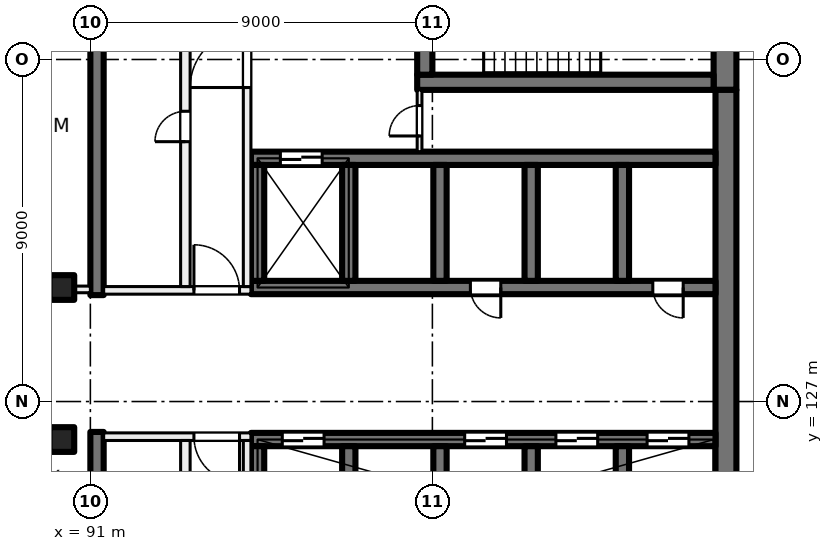
"""IFC4 building model, lengths in metres.
Left out: names, types, materials, properties, quantities, classifications, styles, units other than length and angle.
Written with IfcOpenShell. Run it as: python <this file> out.ifc"""

import sys

from ifc_helpers import new_model, si_unit, direction, frame, frame_2d, origin, origin_2d, place, context, subcontext, project, spatial, rectangle, extrude, element, fill, save


model = new_model("IFC4")
c1 = context("Model", 3, precision=1e-05, world=origin(), true_north=direction((0.0, 1.0)))
c2 = subcontext(c1, "Body", "Model", "MODEL_VIEW")
j1 = project(units=[si_unit("LENGTHUNIT", "METRE"), si_unit("PLANEANGLEUNIT", "RADIAN")], contexts=[c1])
p1 = place(None, origin())
s1 = spatial("IfcSite", under=j1, at=p1, CompositionType="ELEMENT")
p2 = place(p1, origin())
s2 = spatial("IfcBuilding", under=s1, at=p2, CompositionType="ELEMENT")
p3 = place(p2, frame((0.0, 0.0, 146.5)))
s3 = spatial("IfcBuildingStorey", under=s2, at=p3, CompositionType="ELEMENT", Elevation=146.5)
for number, where, z_axis, x_axis in (
    (1, (90.25, 130.0, 0.0), (0.0, 0.0, 1.0), (1.0, 0.0, 0.0)),
    (2, (90.25, 126.0, 0.0), (0.0, 0.0, 1.0), (1.0, 0.0, 0.0)),
):
    element("IfcColumn", number, at=place(p3, frame(where, z_axis=z_axis, x_axis=x_axis)), inside=s3, PredefinedType="COLUMN", context=c2, shape_type="SweptSolid", body=[
        extrude(rectangle(XDim=0.65, YDim=0.65, at=origin_2d()), origin(), (0.0, 0.0, 1.0), 4.0),
    ])
p4 = place(p3, frame((107.7, 139.0, 0.0), z_axis=(0.0, 0.0, 1.0), x_axis=(0.0, -1.0, 0.0)))
e3 = element("IfcWall", 3, at=p4, inside=s3, PredefinedType="SHEAR", context=c2, shape_type="SweptSolid", body=[
    extrude(rectangle(XDim=3.8, YDim=0.6, at=frame_2d((1.9, 0.0))), origin(), (0.0, 0.0, 1.0), 4.0),
])
p5 = place(p3, frame((107.725, 135.2, 0.0), z_axis=(0.0, 0.0, 1.0), x_axis=(0.0, -1.0, 0.0)))
e4 = element("IfcWall", 4, at=p5, inside=s3, PredefinedType="SHEAR", context=c2, shape_type="SweptSolid", body=[
    extrude(rectangle(XDim=14.4, YDim=0.55, at=frame_2d((7.2, 0.0))), origin(), (0.0, 0.0, 1.0), 4.0),
])
p6 = place(p3, frame((107.4, 135.4, 0.0), z_axis=(0.0, 0.0, 1.0), x_axis=(-1.0, 0.0, 0.0)))
e5 = element("IfcWall", 5, at=p6, inside=s3, PredefinedType="SHEAR", context=c2, shape_type="SweptSolid", body=[
    extrude(rectangle(XDim=7.8, YDim=0.4, at=frame_2d((3.9, 0.0))), origin(), (0.0, 0.0, 1.0), 4.0),
])
p7 = place(p3, frame((99.8, 138.4, 0.0), z_axis=(0.0, 0.0, 1.0), x_axis=(0.0, -1.0, 0.0)))
e6 = element("IfcWall", 6, at=p7, inside=s3, PredefinedType="SHEAR", context=c2, shape_type="SweptSolid", body=[
    extrude(rectangle(XDim=2.8, YDim=0.4, at=frame_2d((1.4, 0.0))), origin(), (0.0, 0.0, 1.0), 4.0),
])
p8 = place(p7, frame((0.875, 0.0, 0.0)))
e7 = element("IfcOpeningElement", 7, at=p8, cuts=e6, PredefinedType="OPENING", context=c2, shape_type="SweptSolid", body=[
    extrude(rectangle(XDim=1.0, YDim=2.1, at=frame_2d((0.5, 1.05))), frame((0.0, 0.21, 0.0), z_axis=(0.0, -1.0, 0.0), x_axis=(1.0, 0.0, 0.0)), (0.0, 0.0, 1.0), 0.42),
])
p9 = place(p3, frame((107.45, 130.0, 0.0), z_axis=(0.0, 0.0, 1.0), x_axis=(-1.0, 0.0, 0.0)))
e8 = element("IfcWall", 8, at=p9, inside=s3, PredefinedType="SHEAR", context=c2, shape_type="SweptSolid", body=[
    extrude(rectangle(XDim=12.225, YDim=0.35, at=frame_2d((6.112, 0.0))), origin(), (0.0, 0.0, 1.0), 4.0),
])
p10 = place(p9, frame((0.85, 0.0, 0.0)))
e9 = element("IfcOpeningElement", 9, at=p10, cuts=e8, PredefinedType="OPENING", context=c2, shape_type="SweptSolid", body=[
    extrude(rectangle(XDim=0.8, YDim=2.1, at=frame_2d((0.4, 1.05))), frame((0.0, 0.185, 0.0), z_axis=(0.0, -1.0, 0.0), x_axis=(1.0, 0.0, 0.0)), (0.0, 0.0, 1.0), 0.37),
])
p11 = place(p9, frame((5.65, 0.0, 0.0)))
e10 = element("IfcOpeningElement", 10, at=p11, cuts=e8, PredefinedType="OPENING", context=c2, shape_type="SweptSolid", body=[
    extrude(rectangle(XDim=0.8, YDim=2.1, at=frame_2d((0.4, 1.05))), frame((0.0, 0.185, 0.0), z_axis=(0.0, -1.0, 0.0), x_axis=(1.0, 0.0, 0.0)), (0.0, 0.0, 1.0), 0.37),
])
p12 = place(p3, frame((107.45, 133.4, 0.0), z_axis=(0.0, 0.0, 1.0), x_axis=(-1.0, 0.0, 0.0)))
e11 = element("IfcWall", 11, at=p12, inside=s3, PredefinedType="SHEAR", context=c2, shape_type="SweptSolid", body=[
    extrude(rectangle(XDim=12.225, YDim=0.35, at=frame_2d((6.112, 0.0))), origin(), (0.0, 0.0, 1.0), 4.0),
])
p13 = place(p12, frame((10.35, 0.0, 0.0)))
e12 = element("IfcOpeningElement", 12, at=p13, cuts=e11, PredefinedType="OPENING", context=c2, shape_type="SweptSolid", body=[
    extrude(rectangle(XDim=1.1, YDim=2.1, at=frame_2d((0.55, 1.05))), frame((0.0, 0.185, 0.0), z_axis=(0.0, -1.0, 0.0), x_axis=(1.0, 0.0, 0.0)), (0.0, 0.0, 1.0), 0.37),
])
for number, where, z_axis, x_axis in (
    (13, (105.0, 133.225, 0.0), (0.0, 0.0, 1.0), (0.0, -1.0, 0.0)),
    (14, (102.6, 133.225, 0.0), (0.0, 0.0, 1.0), (0.0, -1.0, 0.0)),
    (15, (100.2, 133.225, 0.0), (0.0, 0.0, 1.0), (0.0, -1.0, 0.0)),
    (16, (97.8, 133.225, 0.0), (0.0, 0.0, 1.0), (0.0, -1.0, 0.0)),
    (17, (95.4, 133.225, 0.0), (0.0, 0.0, 1.0), (0.0, -1.0, 0.0)),
):
    element("IfcWall", number, at=place(p3, frame(where, z_axis=z_axis, x_axis=x_axis)), inside=s3, PredefinedType="SHEAR", context=c2, shape_type="SweptSolid", body=[
        extrude(rectangle(XDim=3.05, YDim=0.35, at=frame_2d((1.525, 0.0))), origin(), (0.0, 0.0, 1.0), 4.0),
    ])
p14 = place(p3, frame((107.45, 126.0, 0.0), z_axis=(0.0, 0.0, 1.0), x_axis=(-1.0, 0.0, 0.0)))
e18 = element("IfcWall", 18, at=p14, inside=s3, PredefinedType="SHEAR", context=c2, shape_type="SweptSolid", body=[
    extrude(rectangle(XDim=12.225, YDim=0.35, at=frame_2d((6.112, 0.0))), origin(), (0.0, 0.0, 1.0), 4.0),
])
p15 = place(p14, frame((0.7, 0.0, 0.0)))
e19 = element("IfcOpeningElement", 19, at=p15, cuts=e18, PredefinedType="OPENING", context=c2, shape_type="SweptSolid", body=[
    extrude(rectangle(XDim=1.1, YDim=2.1, at=frame_2d((0.55, 1.05))), frame((0.0, 0.185, 0.0), z_axis=(0.0, -1.0, 0.0), x_axis=(1.0, 0.0, 0.0)), (0.0, 0.0, 1.0), 0.37),
])
p16 = place(p14, frame((3.1, 0.0, 0.0)))
e20 = element("IfcOpeningElement", 20, at=p16, cuts=e18, PredefinedType="OPENING", context=c2, shape_type="SweptSolid", body=[
    extrude(rectangle(XDim=1.1, YDim=2.1, at=frame_2d((0.55, 1.05))), frame((0.0, 0.185, 0.0), z_axis=(0.0, -1.0, 0.0), x_axis=(1.0, 0.0, 0.0)), (0.0, 0.0, 1.0), 0.37),
])
p17 = place(p14, frame((5.5, 0.0, 0.0)))
e21 = element("IfcOpeningElement", 21, at=p17, cuts=e18, PredefinedType="OPENING", context=c2, shape_type="SweptSolid", body=[
    extrude(rectangle(XDim=1.1, YDim=2.1, at=frame_2d((0.55, 1.05))), frame((0.0, 0.185, 0.0), z_axis=(0.0, -1.0, 0.0), x_axis=(1.0, 0.0, 0.0)), (0.0, 0.0, 1.0), 0.37),
])
p18 = place(p14, frame((10.3, 0.0, 0.0)))
e22 = element("IfcOpeningElement", 22, at=p18, cuts=e18, PredefinedType="OPENING", context=c2, shape_type="SweptSolid", body=[
    extrude(rectangle(XDim=1.1, YDim=2.1, at=frame_2d((0.55, 1.05))), frame((0.0, 0.185, 0.0), z_axis=(0.0, -1.0, 0.0), x_axis=(1.0, 0.0, 0.0)), (0.0, 0.0, 1.0), 0.37),
])
for number, where, z_axis, x_axis in (
    (23, (105.0, 125.825, 0.0), (0.0, 0.0, 1.0), (0.0, -1.0, 0.0)),
    (24, (102.6, 125.825, 0.0), (0.0, 0.0, 1.0), (0.0, -1.0, 0.0)),
    (25, (100.2, 125.825, 0.0), (0.0, 0.0, 1.0), (0.0, -1.0, 0.0)),
    (26, (97.8, 125.825, 0.0), (0.0, 0.0, 1.0), (0.0, -1.0, 0.0)),
    (27, (95.4, 125.825, 0.0), (0.0, 0.0, 1.0), (0.0, -1.0, 0.0)),
):
    element("IfcWall", number, at=place(p3, frame(where, z_axis=z_axis, x_axis=x_axis)), inside=s3, PredefinedType="SHEAR", context=c2, shape_type="SweptSolid", body=[
        extrude(rectangle(XDim=3.05, YDim=0.35, at=frame_2d((1.525, 0.0))), origin(), (0.0, 0.0, 1.0), 4.0),
    ])
for number, where, z_axis, x_axis in (
    (28, (91.175, 138.45, 0.0), (0.0, 0.0, 1.0), (0.0, -1.0, 0.0)),
    (29, (91.175, 126.2, 0.0), (0.0, 0.0, 1.0), (0.0, -1.0, 0.0)),
):
    element("IfcWall", number, at=place(p3, frame(where, z_axis=z_axis, x_axis=x_axis)), inside=s3, PredefinedType="SHEAR", context=c2, shape_type="SweptSolid", body=[
        extrude(rectangle(XDim=8.65, YDim=0.35, at=frame_2d((4.325, 0.0))), origin(), (0.0, 0.0, 1.0), 4.0),
    ])
p19 = place(p3, frame((95.225, 126.075, 0.0), z_axis=(0.0, 0.0, 1.0), x_axis=(-1.0, 0.0, 0.0)))
e30 = element("IfcWall", 30, at=p19, inside=s3, PredefinedType="PARTITIONING", context=c2, shape_type="SweptSolid", body=[
    extrude(rectangle(XDim=3.875, YDim=0.2, at=frame_2d((1.938, 0.0))), origin(), (0.0, 0.0, 1.0), 3.625),
])
p20 = place(p19, frame((0.3, 0.0, 0.0)))
e31 = element("IfcOpeningElement", 31, at=p20, cuts=e30, PredefinedType="OPENING", context=c2, shape_type="SweptSolid", body=[
    extrude(rectangle(XDim=1.2, YDim=2.1, at=frame_2d((0.6, 1.05))), frame((0.0, 0.11, 0.0), z_axis=(0.0, -1.0, 0.0), x_axis=(1.0, 0.0, 0.0)), (0.0, 0.0, 1.0), 0.22),
])
p21 = place(p3, frame((95.125, 117.55, 0.0), z_axis=(0.0, 0.0, 1.0), x_axis=(0.0, 1.0, 0.0)))
e32 = element("IfcWall", 32, at=p21, inside=s3, PredefinedType="PARTITIONING", context=c2, shape_type="SweptSolid", body=[
    extrude(rectangle(XDim=8.425, YDim=0.2, at=frame_2d((4.212, 0.0))), origin(), (0.0, 0.0, 1.0), 3.625),
])
p22 = place(p21, frame((1.688, 0.0, 0.0)))
e33 = element("IfcOpeningElement", 33, at=p22, cuts=e32, PredefinedType="OPENING", context=c2, shape_type="SweptSolid", body=[
    extrude(rectangle(XDim=1.5, YDim=2.1, at=frame_2d((0.75, 1.05))), frame((0.0, 0.11, 0.0), z_axis=(0.0, -1.0, 0.0), x_axis=(1.0, 0.0, 0.0)), (0.0, 0.0, 1.0), 0.22),
])
p23 = place(p3, frame((93.5, 117.55, 0.0), z_axis=(0.0, 0.0, 1.0), x_axis=(0.0, 1.0, 0.0)))
e34 = element("IfcWall", 34, at=p23, inside=s3, PredefinedType="PARTITIONING", context=c2, shape_type="SweptSolid", body=[
    extrude(rectangle(XDim=8.425, YDim=0.25, at=frame_2d((4.212, 0.0))), origin(), (0.0, 0.0, 1.0), 3.625),
])
p24 = place(p23, frame((6.647, 0.0, 0.0)))
e35 = element("IfcOpeningElement", 35, at=p24, cuts=e34, PredefinedType="OPENING", context=c2, shape_type="SweptSolid", body=[
    extrude(rectangle(XDim=0.8, YDim=2.1, at=frame_2d((0.4, 1.05))), frame((0.0, 0.135, 0.0), z_axis=(0.0, -1.0, 0.0), x_axis=(1.0, 0.0, 0.0)), (0.0, 0.0, 1.0), 0.27),
])
p25 = place(p23, frame((2.285, 0.0, 0.0)))
e36 = element("IfcOpeningElement", 36, at=p25, cuts=e34, PredefinedType="OPENING", context=c2, shape_type="SweptSolid", body=[
    extrude(rectangle(XDim=1.0, YDim=2.1, at=frame_2d((0.5, 1.05))), frame((0.0, 0.135, 0.0), z_axis=(0.0, -1.0, 0.0), x_axis=(1.0, 0.0, 0.0)), (0.0, 0.0, 1.0), 0.27),
])
p26 = place(p3, frame((91.35, 129.925, 0.0), z_axis=(0.0, 0.0, 1.0), x_axis=(1.0, 0.0, 0.0)))
e37 = element("IfcWall", 37, at=p26, inside=s3, PredefinedType="PARTITIONING", context=c2, shape_type="SweptSolid", body=[
    extrude(rectangle(XDim=3.875, YDim=0.2, at=frame_2d((1.938, 0.0))), origin(), (0.0, 0.0, 1.0), 3.625),
])
p27 = place(p26, frame((2.375, 0.0, 0.0)))
e38 = element("IfcOpeningElement", 38, at=p27, cuts=e37, PredefinedType="OPENING", context=c2, shape_type="SweptSolid", body=[
    extrude(rectangle(XDim=1.2, YDim=2.1, at=frame_2d((0.6, 1.05))), frame((0.0, 0.11, 0.0), z_axis=(0.0, -1.0, 0.0), x_axis=(1.0, 0.0, 0.0)), (0.0, 0.0, 1.0), 0.22),
])
p28 = place(p3, frame((95.125, 130.025, 0.0), z_axis=(0.0, 0.0, 1.0), x_axis=(0.0, 1.0, 0.0)))
e39 = element("IfcWall", 39, at=p28, inside=s3, PredefinedType="PARTITIONING", context=c2, shape_type="SweptSolid", body=[
    extrude(rectangle(XDim=8.425, YDim=0.2, at=frame_2d((4.212, 0.0))), origin(), (0.0, 0.0, 1.0), 3.625),
])
p29 = place(p28, frame((5.238, 0.0, 0.0)))
e40 = element("IfcOpeningElement", 40, at=p29, cuts=e39, PredefinedType="OPENING", context=c2, shape_type="SweptSolid", body=[
    extrude(rectangle(XDim=1.5, YDim=2.1, at=frame_2d((0.75, 1.05))), frame((0.0, 0.11, 0.0), z_axis=(0.0, -1.0, 0.0), x_axis=(1.0, 0.0, 0.0)), (0.0, 0.0, 1.0), 0.22),
])
p30 = place(p3, frame((93.5, 130.025, 0.0), z_axis=(0.0, 0.0, 1.0), x_axis=(0.0, 1.0, 0.0)))
e41 = element("IfcWall", 41, at=p30, inside=s3, PredefinedType="PARTITIONING", context=c2, shape_type="SweptSolid", body=[
    extrude(rectangle(XDim=8.425, YDim=0.25, at=frame_2d((4.212, 0.0))), origin(), (0.0, 0.0, 1.0), 3.625),
])
p31 = place(p30, frame((3.812, 0.0, 0.0)))
e42 = element("IfcOpeningElement", 42, at=p31, cuts=e41, PredefinedType="OPENING", context=c2, shape_type="SweptSolid", body=[
    extrude(rectangle(XDim=0.8, YDim=2.1, at=frame_2d((0.4, 1.05))), frame((0.0, 0.135, 0.0), z_axis=(0.0, -1.0, 0.0), x_axis=(1.0, 0.0, 0.0)), (0.0, 0.0, 1.0), 0.27),
])
p32 = place(p3, frame((99.663, 133.575, 0.0), z_axis=(0.0, 0.0, 1.0), x_axis=(0.0, 1.0, 0.0)))
e43 = element("IfcWall", 43, at=p32, inside=s3, PredefinedType="PARTITIONING", context=c2, shape_type="SweptSolid", body=[
    extrude(rectangle(XDim=1.625, YDim=0.125, at=frame_2d((0.812, 0.0))), origin(), (0.0, 0.0, 1.0), 3.625),
])
p33 = place(p32, frame((0.413, 0.0, 0.0)))
e44 = element("IfcOpeningElement", 44, at=p33, cuts=e43, PredefinedType="OPENING", context=c2, shape_type="SweptSolid", body=[
    extrude(rectangle(XDim=0.8, YDim=2.1, at=frame_2d((0.4, 1.05))), frame((0.0, 0.073, 0.0), z_axis=(0.0, -1.0, 0.0), x_axis=(1.0, 0.0, 0.0)), (0.0, 0.0, 1.0), 0.145),
])
p34 = place(p3, frame((85.838, 129.95, 0.0), z_axis=(0.0, 0.0, 1.0), x_axis=(1.0, 0.0, 0.0)))
e45 = element("IfcWall", 45, at=p34, inside=s3, PredefinedType="PARTITIONING", context=c2, shape_type="SweptSolid", body=[
    extrude(rectangle(XDim=5.162, YDim=0.175, at=frame_2d((2.581, 0.0))), origin(), (0.0, 0.0, 1.0), 3.625),
])
p35 = place(p34, frame((1.971, 0.0, 0.0)))
e46 = element("IfcOpeningElement", 46, at=p35, cuts=e45, PredefinedType="OPENING", context=c2, shape_type="SweptSolid", body=[
    extrude(rectangle(XDim=1.2, YDim=2.1, at=frame_2d((0.6, 1.05))), frame((0.0, 0.097, 0.0), z_axis=(0.0, -1.0, 0.0), x_axis=(1.0, 0.0, 0.0)), (0.0, 0.0, 1.0), 0.195),
])
p36 = place(p15, origin())
e47 = element("IfcDoor", 47, at=p36, inside=s3, OperationType="DOUBLE_DOOR_SLIDING", PredefinedType="DOOR", context=c2, shape_type="SweptSolid", body=[
    extrude(rectangle(XDim=1.1, YDim=2.1, at=frame_2d((0.55, 1.05))), frame((0.0, 0.025, 0.0), z_axis=(0.0, -1.0, 0.0), x_axis=(1.0, 0.0, 0.0)), (0.0, 0.0, 1.0), 0.05),
])
fill(e19, e47)
p37 = place(p16, origin())
e48 = element("IfcDoor", 48, at=p37, inside=s3, OperationType="DOUBLE_DOOR_SLIDING", PredefinedType="DOOR", context=c2, shape_type="SweptSolid", body=[
    extrude(rectangle(XDim=1.1, YDim=2.1, at=frame_2d((0.55, 1.05))), frame((0.0, 0.025, 0.0), z_axis=(0.0, -1.0, 0.0), x_axis=(1.0, 0.0, 0.0)), (0.0, 0.0, 1.0), 0.05),
])
fill(e20, e48)
p38 = place(p17, origin())
e49 = element("IfcDoor", 49, at=p38, inside=s3, OperationType="DOUBLE_DOOR_SLIDING", PredefinedType="DOOR", context=c2, shape_type="SweptSolid", body=[
    extrude(rectangle(XDim=1.1, YDim=2.1, at=frame_2d((0.55, 1.05))), frame((0.0, 0.025, 0.0), z_axis=(0.0, -1.0, 0.0), x_axis=(1.0, 0.0, 0.0)), (0.0, 0.0, 1.0), 0.05),
])
fill(e21, e49)
p39 = place(p18, origin())
e50 = element("IfcDoor", 50, at=p39, inside=s3, OperationType="DOUBLE_DOOR_SLIDING", PredefinedType="DOOR", context=c2, shape_type="SweptSolid", body=[
    extrude(rectangle(XDim=1.1, YDim=2.1, at=frame_2d((0.55, 1.05))), frame((0.0, 0.025, 0.0), z_axis=(0.0, -1.0, 0.0), x_axis=(1.0, 0.0, 0.0)), (0.0, 0.0, 1.0), 0.05),
])
fill(e22, e50)
p40 = place(p10, origin())
e51 = element("IfcDoor", 51, at=p40, inside=s3, OperationType="SINGLE_SWING_LEFT", PredefinedType="DOOR", context=c2, shape_type="SweptSolid", body=[
    extrude(rectangle(XDim=0.8, YDim=2.1, at=frame_2d((0.4, 1.05))), frame((0.0, 0.025, 0.0), z_axis=(0.0, -1.0, 0.0), x_axis=(1.0, 0.0, 0.0)), (0.0, 0.0, 1.0), 0.05),
])
fill(e9, e51)
p41 = place(p11, origin())
e52 = element("IfcDoor", 52, at=p41, inside=s3, OperationType="SINGLE_SWING_RIGHT", PredefinedType="DOOR", context=c2, shape_type="SweptSolid", body=[
    extrude(rectangle(XDim=0.8, YDim=2.1, at=frame_2d((0.4, 1.05))), frame((0.0, 0.025, 0.0), z_axis=(0.0, -1.0, 0.0), x_axis=(1.0, 0.0, 0.0)), (0.0, 0.0, 1.0), 0.05),
])
fill(e10, e52)
p42 = place(p20, origin())
e53 = element("IfcDoor", 53, at=p42, inside=s3, OperationType="DOUBLE_DOOR_SINGLE_SWING", PredefinedType="DOOR", context=c2, shape_type="SweptSolid", body=[
    extrude(rectangle(XDim=1.2, YDim=2.1, at=frame_2d((0.6, 1.05))), frame((0.0, 0.025, 0.0), z_axis=(0.0, -1.0, 0.0), x_axis=(1.0, 0.0, 0.0)), (0.0, 0.0, 1.0), 0.05),
])
fill(e31, e53)
p43 = place(p27, origin())
e54 = element("IfcDoor", 54, at=p43, inside=s3, OperationType="DOUBLE_DOOR_SINGLE_SWING", PredefinedType="DOOR", context=c2, shape_type="SweptSolid", body=[
    extrude(rectangle(XDim=1.2, YDim=2.1, at=frame_2d((0.6, 1.05))), frame((0.0, 0.025, 0.0), z_axis=(0.0, -1.0, 0.0), x_axis=(1.0, 0.0, 0.0)), (0.0, 0.0, 1.0), 0.05),
])
fill(e38, e54)
p44 = place(p29, origin())
e55 = element("IfcDoor", 55, at=p44, inside=s3, OperationType="DOUBLE_DOOR_SINGLE_SWING", PredefinedType="DOOR", context=c2, shape_type="SweptSolid", body=[
    extrude(rectangle(XDim=1.5, YDim=2.1, at=frame_2d((0.75, 1.05))), frame((0.0, 0.025, 0.0), z_axis=(0.0, -1.0, 0.0), x_axis=(1.0, 0.0, 0.0)), (0.0, 0.0, 1.0), 0.05),
])
fill(e40, e55)
p45 = place(p33, origin())
e56 = element("IfcDoor", 56, at=p45, inside=s3, OperationType="SINGLE_SWING_LEFT", PredefinedType="DOOR", context=c2, shape_type="SweptSolid", body=[
    extrude(rectangle(XDim=0.8, YDim=2.1, at=frame_2d((0.4, 1.05))), frame((0.0, 0.025, 0.0), z_axis=(0.0, -1.0, 0.0), x_axis=(1.0, 0.0, 0.0)), (0.0, 0.0, 1.0), 0.05),
])
fill(e44, e56)
p46 = place(p31, origin())
e57 = element("IfcDoor", 57, at=p46, inside=s3, OperationType="SINGLE_SWING_RIGHT", PredefinedType="DOOR", context=c2, shape_type="SweptSolid", body=[
    extrude(rectangle(XDim=0.8, YDim=2.1, at=frame_2d((0.4, 1.05))), frame((0.0, 0.025, 0.0), z_axis=(0.0, -1.0, 0.0), x_axis=(1.0, 0.0, 0.0)), (0.0, 0.0, 1.0), 0.05),
])
fill(e42, e57)
p47 = place(p13, origin())
e58 = element("IfcDoor", 58, at=p47, inside=s3, OperationType="DOUBLE_DOOR_SLIDING", PredefinedType="DOOR", context=c2, shape_type="SweptSolid", body=[
    extrude(rectangle(XDim=1.1, YDim=2.1, at=frame_2d((0.55, 1.05))), frame((0.0, 0.025, 0.0), z_axis=(0.0, -1.0, 0.0), x_axis=(1.0, 0.0, 0.0)), (0.0, 0.0, 1.0), 0.05),
])
fill(e12, e58)
save(model, sys.argv[1])
